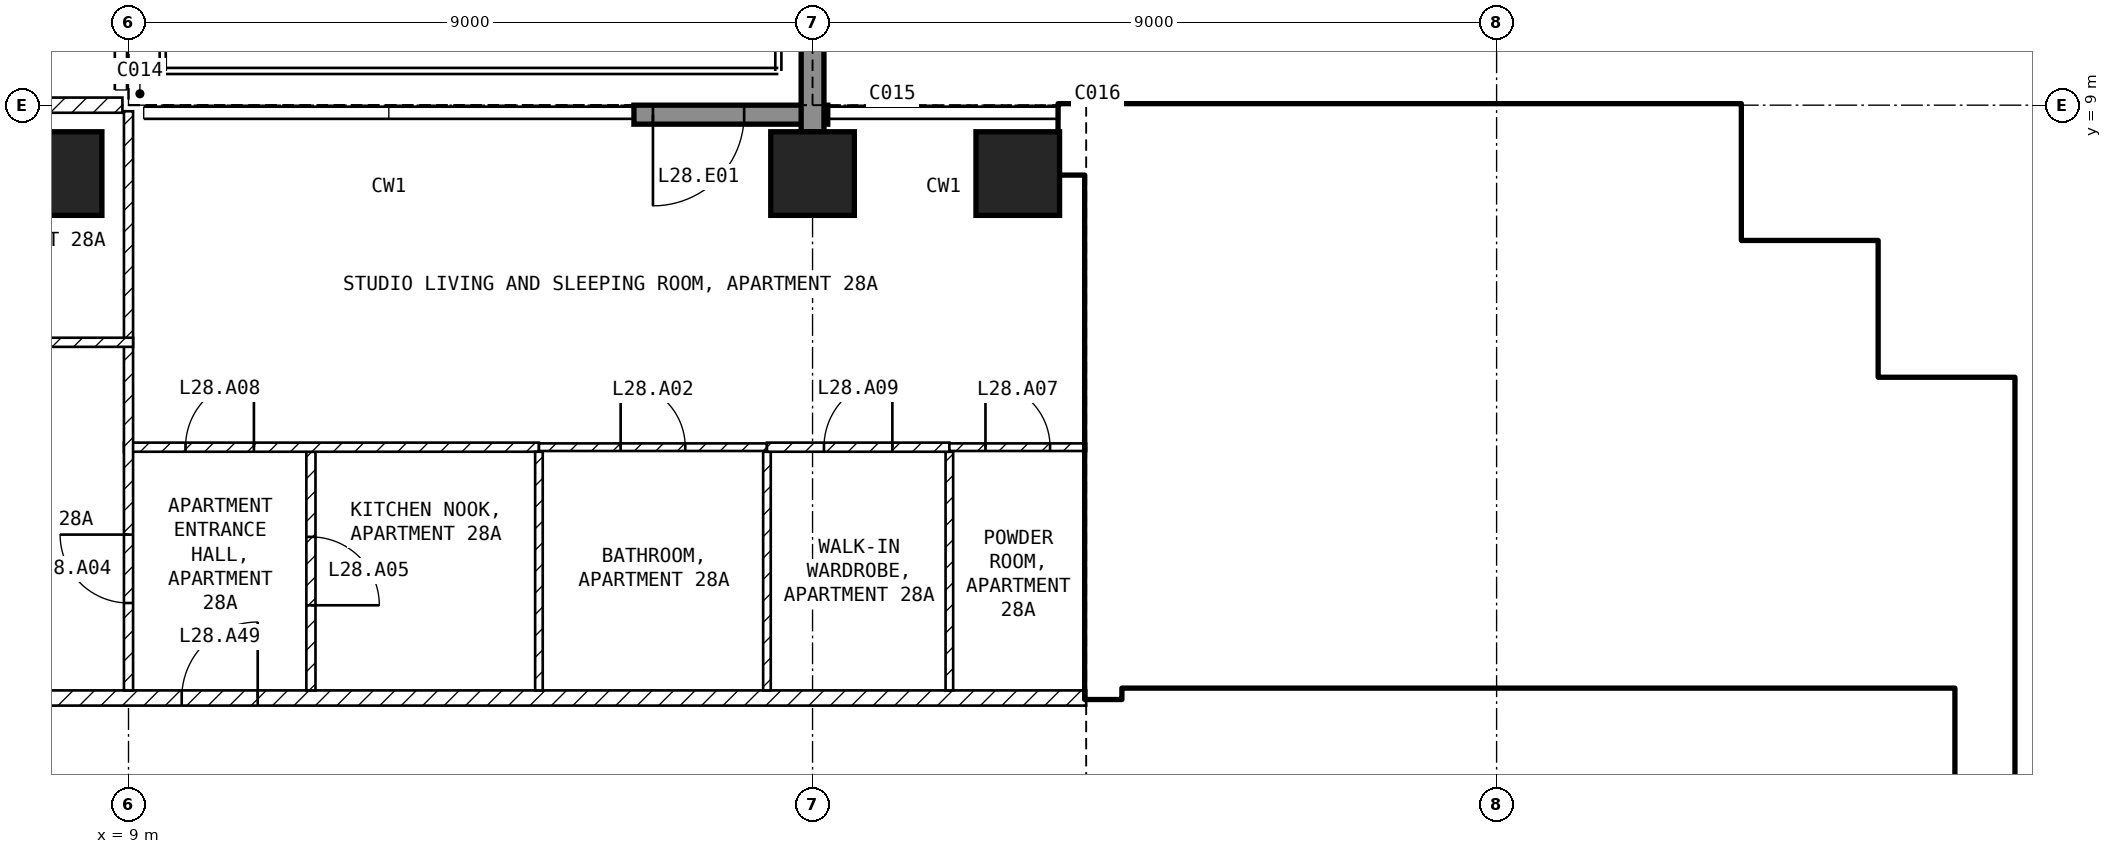
"""IFC4 building model, lengths in metres.
Left out: names, types, materials, properties, quantities, classifications, styles, units other than length and angle.
Written with IfcOpenShell. Run it as: python <this file> out.ifc"""

import sys

from ifc_helpers import new_model, si_unit, direction, frame, frame_2d, origin, origin_2d, place, context, subcontext, project, spatial, rectangle, extrude, element, fill, save


model = new_model("IFC4")
c1 = context("Model", 3, precision=1e-05, world=origin(), true_north=direction((0.0, 1.0)))
c2 = subcontext(c1, "Body", "Model", "MODEL_VIEW")
j1 = project(units=[si_unit("LENGTHUNIT", "METRE"), si_unit("PLANEANGLEUNIT", "RADIAN")], contexts=[c1])
p1 = place(None, origin())
s1 = spatial("IfcSite", under=j1, at=p1, CompositionType="ELEMENT")
p2 = place(p1, origin())
s2 = spatial("IfcBuilding", under=s1, at=p2, CompositionType="ELEMENT")
p3 = place(p2, frame((0.0, 0.0, 119.9)))
s3 = spatial("IfcBuildingStorey", under=s2, at=p3, CompositionType="ELEMENT", Elevation=119.9)
for number, where, z_axis, x_axis in (
    (1, (8.1, 8.1, -0.25), (0.0, 0.0, 1.0), (1.0, 0.0, 0.0)),
    (2, (18.0, 8.1, -0.25), (0.0, 0.0, 1.0), (1.0, 0.0, 0.0)),
    (3, (20.7, 8.1, -0.25), (0.0, 0.0, 1.0), (1.0, 0.0, 0.0)),
):
    element("IfcColumn", number, at=place(p3, frame(where, z_axis=z_axis, x_axis=x_axis)), inside=s3, PredefinedType="COLUMN", context=c2, shape_type="SweptSolid", body=[
        extrude(rectangle(XDim=1.1, YDim=1.1, at=origin_2d()), origin(), (0.0, 0.0, 1.0), 3.5),
    ])
p4 = place(p3, frame((18.2, 8.875, 0.0), z_axis=(0.0, 0.0, 1.0), x_axis=(-1.0, 0.0, 0.0)))
e4 = element("IfcWall", 4, at=p4, inside=s3, PredefinedType="SOLIDWALL", context=c2, shape_type="SweptSolid", body=[
    extrude(rectangle(XDim=2.55, YDim=0.25, at=frame_2d((1.275, 0.0))), origin(), (0.0, 0.0, 1.0), 3.25),
])
p5 = place(p4, frame((1.1, 0.0, 0.0)))
e5 = element("IfcOpeningElement", 5, at=p5, cuts=e4, PredefinedType="OPENING", context=c2, shape_type="SweptSolid", body=[
    extrude(rectangle(XDim=1.2, YDim=2.4, at=frame_2d((0.6, 1.2))), frame((0.0, 0.135, 0.0), z_axis=(0.0, -1.0, 0.0), x_axis=(1.0, 0.0, 0.0)), (0.0, 0.0, 1.0), 0.27),
])
p6 = place(p3, frame((18.0, 8.65, 0.0), z_axis=(0.0, 0.0, 1.0), x_axis=(0.0, 1.0, 0.0)))
e6 = element("IfcWall", 6, at=p6, inside=s3, PredefinedType="SOLIDWALL", context=c2, shape_type="SweptSolid", body=[
    extrude(rectangle(XDim=3.09, YDim=0.3, at=frame_2d((1.545, 0.0))), origin(), (0.0, 0.0, 1.0), 3.25),
])
p7 = place(p3, frame((33.425, -4.65, 0.0), z_axis=(0.0, 0.0, 1.0), x_axis=(0.0, 1.0, 0.0)))
e7 = element("IfcWall", 7, at=p7, inside=s3, PredefinedType="SHEAR", context=c2, shape_type="SweptSolid", body=[
    extrude(rectangle(XDim=10.05, YDim=0.75, at=frame_2d((5.025, 0.0))), origin(), (0.0, 0.0, 1.0), 3.25),
])
for number, where, z_axis, x_axis in (
    (8, (31.25, 5.025, 0.0), (0.0, 0.0, 1.0), (1.0, 0.0, 0.0)),
    (9, (31.625, 5.4, 0.0), (0.0, 0.0, 1.0), (0.0, 1.0, 0.0)),
    (10, (29.45, 6.825, 0.0), (0.0, 0.0, 1.0), (1.0, 0.0, 0.0)),
    (11, (29.825, 7.2, 0.0), (0.0, 0.0, 1.0), (0.0, 1.0, 0.0)),
):
    element("IfcWall", number, at=place(p3, frame(where, z_axis=z_axis, x_axis=x_axis)), inside=s3, PredefinedType="SHEAR", context=c2, shape_type="SweptSolid", body=[
        extrude(rectangle(XDim=1.8, YDim=0.75, at=frame_2d((0.9, 0.0))), origin(), (0.0, 0.0, 1.0), 3.25),
    ])
p8 = place(p3, frame((21.25, 8.55, 0.0), z_axis=(0.0, 0.0, 1.0), x_axis=(1.0, 0.0, 0.0)))
e12 = element("IfcWall", 12, at=p8, inside=s3, PredefinedType="SHEAR", context=c2, shape_type="SweptSolid", body=[
    extrude(rectangle(XDim=8.2, YDim=0.9, at=frame_2d((4.1, 0.0))), origin(), (0.0, 0.0, 1.0), 3.25),
])
p9 = place(p3, frame((21.825, 1.2, 0.0), z_axis=(0.0, 0.0, 1.0), x_axis=(0.0, 1.0, 0.0)))
e13 = element("IfcWall", 13, at=p9, inside=s3, PredefinedType="SHEAR", context=c2, shape_type="SweptSolid", body=[
    extrude(rectangle(XDim=6.9, YDim=0.45, at=frame_2d((3.45, 0.0))), origin(), (0.0, 0.0, 1.0), 3.25),
])
p10 = place(p3, frame((22.05, 1.45, 0.0), z_axis=(0.0, 0.0, 1.0), x_axis=(1.0, 0.0, 0.0)))
e14 = element("IfcWall", 14, at=p10, inside=s3, PredefinedType="SOLIDWALL", context=c2, shape_type="SweptSolid", body=[
    extrude(rectangle(XDim=11.0, YDim=0.2, at=frame_2d((5.5, 0.0))), origin(), (0.0, 0.0, 1.0), 3.25),
])
p11 = place(p10, frame((0.75, 0.0, 0.0)))
e15 = element("IfcOpeningElement", 15, at=p11, cuts=e14, PredefinedType="OPENING", context=c2, shape_type="SweptSolid", body=[
    extrude(rectangle(XDim=1.0, YDim=2.1, at=frame_2d((0.5, 1.05))), frame((0.0, 0.11, 0.0), z_axis=(0.0, -1.0, 0.0), x_axis=(1.0, 0.0, 0.0)), (0.0, 0.0, 1.0), 0.22),
])
p12 = place(p10, frame((3.25, 0.0, 0.0)))
e16 = element("IfcOpeningElement", 16, at=p12, cuts=e14, PredefinedType="OPENING", context=c2, shape_type="SweptSolid", body=[
    extrude(rectangle(XDim=1.0, YDim=2.1, at=frame_2d((0.5, 1.05))), frame((0.0, 0.11, 0.0), z_axis=(0.0, -1.0, 0.0), x_axis=(1.0, 0.0, 0.0)), (0.0, 0.0, 1.0), 0.22),
])
p13 = place(p10, frame((9.075, 0.0, 0.0)))
e17 = element("IfcOpeningElement", 17, at=p13, cuts=e14, PredefinedType="OPENING", context=c2, shape_type="SweptSolid", body=[
    extrude(rectangle(XDim=0.9, YDim=2.1, at=frame_2d((0.45, 1.05))), frame((0.0, 0.11, 0.0), z_axis=(0.0, -1.0, 0.0), x_axis=(1.0, 0.0, 0.0)), (0.0, 0.0, 1.0), 0.22),
])
p14 = place(p3, frame((22.05, 5.15, 0.0), z_axis=(0.0, 0.0, 1.0), x_axis=(1.0, 0.0, 0.0)))
e18 = element("IfcWall", 18, at=p14, inside=s3, PredefinedType="SOLIDWALL", context=c2, shape_type="SweptSolid", body=[
    extrude(rectangle(XDim=6.3, YDim=0.2, at=frame_2d((3.15, 0.0))), origin(), (0.0, 0.0, 1.0), 3.25),
])
p15 = place(p14, frame((0.2, 0.0, 0.0)))
e19 = element("IfcOpeningElement", 19, at=p15, cuts=e18, PredefinedType="OPENING", context=c2, shape_type="SweptSolid", body=[
    extrude(rectangle(XDim=1.0, YDim=2.1, at=frame_2d((0.5, 1.05))), frame((0.0, 0.11, 0.0), z_axis=(0.0, -1.0, 0.0), x_axis=(1.0, 0.0, 0.0)), (0.0, 0.0, 1.0), 0.22),
])
p16 = place(p3, frame((28.25, 5.25, 0.0), z_axis=(0.0, 0.0, 1.0), x_axis=(0.0, 1.0, 0.0)))
e20 = element("IfcWall", 20, at=p16, inside=s3, PredefinedType="SOLIDWALL", context=c2, shape_type="SweptSolid", body=[
    extrude(rectangle(XDim=2.85, YDim=0.2, at=frame_2d((1.425, 0.0))), origin(), (0.0, 0.0, 1.0), 3.25),
])
p17 = place(p3, frame((27.2, 3.95, 0.0), z_axis=(0.0, 0.0, 1.0), x_axis=(1.0, 0.0, 0.0)))
e21 = element("IfcWall", 21, at=p17, inside=s3, PredefinedType="SOLIDWALL", context=c2, shape_type="SweptSolid", body=[
    extrude(rectangle(XDim=5.85, YDim=0.2, at=frame_2d((2.925, 0.0))), origin(), (0.0, 0.0, 1.0), 3.25),
])
p18 = place(p3, frame((27.1, 1.55, 0.0), z_axis=(0.0, 0.0, 1.0), x_axis=(0.0, 1.0, 0.0)))
e22 = element("IfcWall", 22, at=p18, inside=s3, PredefinedType="SOLIDWALL", context=c2, shape_type="SweptSolid", body=[
    extrude(rectangle(XDim=3.5, YDim=0.2, at=frame_2d((1.75, 0.0))), origin(), (0.0, 0.0, 1.0), 3.25),
])
p19 = place(p18, frame((0.6, 0.0, 0.0)))
e23 = element("IfcOpeningElement", 23, at=p19, cuts=e22, PredefinedType="OPENING", context=c2, shape_type="SweptSolid", body=[
    extrude(rectangle(XDim=1.1, YDim=2.1, at=frame_2d((0.55, 1.05))), frame((0.0, 0.11, 0.0), z_axis=(0.0, -1.0, 0.0), x_axis=(1.0, 0.0, 0.0)), (0.0, 0.0, 1.0), 0.22),
])
p20 = place(p18, frame((2.6, 0.0, 0.0)))
e24 = element("IfcOpeningElement", 24, at=p20, cuts=e22, PredefinedType="OPENING", context=c2, shape_type="SweptSolid", body=[
    extrude(rectangle(XDim=0.8, YDim=2.1, at=frame_2d((0.4, 1.05))), frame((0.0, 0.11, 0.0), z_axis=(0.0, -1.0, 0.0), x_axis=(1.0, 0.0, 0.0)), (0.0, 0.0, 1.0), 0.22),
])
p21 = place(p3, frame((30.0, 1.55, 0.0), z_axis=(0.0, 0.0, 1.0), x_axis=(0.0, 1.0, 0.0)))
e25 = element("IfcWall", 25, at=p21, inside=s3, PredefinedType="SOLIDWALL", context=c2, shape_type="SweptSolid", body=[
    extrude(rectangle(XDim=2.3, YDim=0.2, at=frame_2d((1.15, 0.0))), origin(), (0.0, 0.0, 1.0), 3.25),
])
p22 = place(p3, frame((4.4, 1.2, 0.0), z_axis=(0.0, 0.0, 1.0), x_axis=(1.0, 0.0, 0.0)))
e26 = element("IfcWall", 26, at=p22, inside=s3, PredefinedType="PARTITIONING", context=c2, shape_type="SweptSolid", body=[
    extrude(rectangle(XDim=17.2, YDim=0.2, at=frame_2d((8.6, 0.0))), origin(), (0.0, 0.0, 1.0), 3.25),
])
p23 = place(p22, frame((5.3, 0.0, 0.0)))
e27 = element("IfcOpeningElement", 27, at=p23, cuts=e26, PredefinedType="OPENING", context=c2, shape_type="SweptSolid", body=[
    extrude(rectangle(XDim=1.0, YDim=2.1, at=frame_2d((0.5, 1.05))), frame((0.0, 0.11, 0.0), z_axis=(0.0, -1.0, 0.0), x_axis=(1.0, 0.0, 0.0)), (0.0, 0.0, 1.0), 0.22),
])
p24 = place(p3, frame((-8.92, 9.0, 0.0), z_axis=(0.0, 0.0, 1.0), x_axis=(1.0, 0.0, 0.0)))
e28 = element("IfcWall", 28, at=p24, inside=s3, PredefinedType="PARTITIONING", context=c2, shape_type="SweptSolid", body=[
    extrude(rectangle(XDim=17.84, YDim=0.2, at=frame_2d((8.92, 0.0))), origin(), (0.0, 0.0, 1.0), 3.25),
])
p25 = place(p24, frame((8.42, 0.0, 0.0)))
e29 = element("IfcOpeningElement", 29, at=p25, cuts=e28, PredefinedType="OPENING", context=c2, shape_type="SweptSolid", body=[
    extrude(rectangle(XDim=1.0, YDim=2.1, at=frame_2d((0.5, 1.05))), frame((0.0, 0.11, 0.0), z_axis=(0.0, -1.0, 0.0), x_axis=(1.0, 0.0, 0.0)), (0.0, 0.0, 1.0), 0.22),
])
p26 = place(p3, frame((11.4, 4.44, 0.0), z_axis=(0.0, 0.0, 1.0), x_axis=(0.0, -1.0, 0.0)))
e30 = element("IfcWall", 30, at=p26, inside=s3, PredefinedType="PARTITIONING", context=c2, shape_type="SweptSolid", body=[
    extrude(rectangle(XDim=3.14, YDim=0.12, at=frame_2d((1.57, 0.0))), origin(), (0.0, 0.0, 1.0), 3.25),
])
p27 = place(p26, frame((1.12, 0.0, 0.0)))
e31 = element("IfcOpeningElement", 31, at=p27, cuts=e30, PredefinedType="OPENING", context=c2, shape_type="SweptSolid", body=[
    extrude(rectangle(XDim=0.9, YDim=2.1, at=frame_2d((0.45, 1.05))), frame((0.0, 0.07, 0.0), z_axis=(0.0, -1.0, 0.0), x_axis=(1.0, 0.0, 0.0)), (0.0, 0.0, 1.0), 0.14),
])
p28 = place(p3, frame((8.94, 4.5, 0.0), z_axis=(0.0, 0.0, 1.0), x_axis=(1.0, 0.0, 0.0)))
e32 = element("IfcWall", 32, at=p28, inside=s3, PredefinedType="PARTITIONING", context=c2, shape_type="SweptSolid", body=[
    extrude(rectangle(XDim=5.46, YDim=0.12, at=frame_2d((2.73, 0.0))), origin(), (0.0, 0.0, 1.0), 3.25),
])
p29 = place(p28, frame((0.81, 0.0, 0.0)))
e33 = element("IfcOpeningElement", 33, at=p29, cuts=e32, PredefinedType="OPENING", context=c2, shape_type="SweptSolid", body=[
    extrude(rectangle(XDim=0.9, YDim=2.1, at=frame_2d((0.45, 1.05))), frame((0.0, 0.07, 0.0), z_axis=(0.0, -1.0, 0.0), x_axis=(1.0, 0.0, 0.0)), (0.0, 0.0, 1.0), 0.14),
])
p30 = place(p3, frame((9.0, 1.3, 0.0), z_axis=(0.0, 0.0, 1.0), x_axis=(0.0, 1.0, 0.0)))
e34 = element("IfcWall", 34, at=p30, inside=s3, PredefinedType="PARTITIONING", context=c2, shape_type="SweptSolid", body=[
    extrude(rectangle(XDim=7.62, YDim=0.12, at=frame_2d((3.81, 0.0))), origin(), (0.0, 0.0, 1.0), 3.25),
])
p31 = place(p30, frame((1.15, 0.0, 0.0)))
e35 = element("IfcOpeningElement", 35, at=p31, cuts=e34, PredefinedType="OPENING", context=c2, shape_type="SweptSolid", body=[
    extrude(rectangle(XDim=0.9, YDim=2.1, at=frame_2d((0.45, 1.05))), frame((0.0, 0.07, 0.0), z_axis=(0.0, -1.0, 0.0), x_axis=(1.0, 0.0, 0.0)), (0.0, 0.0, 1.0), 0.14),
])
for number, where, z_axis, x_axis in (
    (36, (14.4, 4.44, 0.0), (0.0, 0.0, 1.0), (0.0, -1.0, 0.0)),
    (37, (17.4, 4.44, 0.0), (0.0, 0.0, 1.0), (0.0, -1.0, 0.0)),
):
    element("IfcWall", number, at=place(p3, frame(where, z_axis=z_axis, x_axis=x_axis)), inside=s3, PredefinedType="PARTITIONING", context=c2, shape_type="SweptSolid", body=[
        extrude(rectangle(XDim=3.14, YDim=0.1, at=frame_2d((1.57, 0.0))), origin(), (0.0, 0.0, 1.0), 3.25),
    ])
p32 = place(p3, frame((14.4, 4.5, 0.0), z_axis=(0.0, 0.0, 1.0), x_axis=(1.0, 0.0, 0.0)))
e38 = element("IfcWall", 38, at=p32, inside=s3, PredefinedType="PARTITIONING", context=c2, shape_type="SweptSolid", body=[
    extrude(rectangle(XDim=3.0, YDim=0.1, at=frame_2d((1.5, 0.0))), origin(), (0.0, 0.0, 1.0), 3.25),
])
p33 = place(p32, frame((1.075, 0.0, 0.0)))
e39 = element("IfcOpeningElement", 39, at=p33, cuts=e38, PredefinedType="OPENING", context=c2, shape_type="SweptSolid", body=[
    extrude(rectangle(XDim=0.85, YDim=2.1, at=frame_2d((0.425, 1.05))), frame((0.0, 0.06, 0.0), z_axis=(0.0, -1.0, 0.0), x_axis=(1.0, 0.0, 0.0)), (0.0, 0.0, 1.0), 0.12),
])
p34 = place(p3, frame((19.8, 4.44, 0.0), z_axis=(0.0, 0.0, 1.0), x_axis=(0.0, -1.0, 0.0)))
e40 = element("IfcWall", 40, at=p34, inside=s3, PredefinedType="PARTITIONING", context=c2, shape_type="SweptSolid", body=[
    extrude(rectangle(XDim=3.14, YDim=0.1, at=frame_2d((1.57, 0.0))), origin(), (0.0, 0.0, 1.0), 3.25),
])
p35 = place(p3, frame((17.4, 4.5, 0.0), z_axis=(0.0, 0.0, 1.0), x_axis=(1.0, 0.0, 0.0)))
e41 = element("IfcWall", 41, at=p35, inside=s3, PredefinedType="PARTITIONING", context=c2, shape_type="SweptSolid", body=[
    extrude(rectangle(XDim=2.4, YDim=0.12, at=frame_2d((1.2, 0.0))), origin(), (0.0, 0.0, 1.0), 3.25),
])
p36 = place(p35, frame((0.75, 0.0, 0.0)))
e42 = element("IfcOpeningElement", 42, at=p36, cuts=e41, PredefinedType="OPENING", context=c2, shape_type="SweptSolid", body=[
    extrude(rectangle(XDim=0.9, YDim=2.1, at=frame_2d((0.45, 1.05))), frame((0.0, 0.07, 0.0), z_axis=(0.0, -1.0, 0.0), x_axis=(1.0, 0.0, 0.0)), (0.0, 0.0, 1.0), 0.14),
])
p37 = place(p3, frame((19.8, 4.5, 0.0), z_axis=(0.0, 0.0, 1.0), x_axis=(1.0, 0.0, 0.0)))
e43 = element("IfcWall", 43, at=p37, inside=s3, PredefinedType="PARTITIONING", context=c2, shape_type="SweptSolid", body=[
    extrude(rectangle(XDim=1.8, YDim=0.1, at=frame_2d((0.9, 0.0))), origin(), (0.0, 0.0, 1.0), 3.25),
])
p38 = place(p37, frame((0.475, 0.0, 0.0)))
e44 = element("IfcOpeningElement", 44, at=p38, cuts=e43, PredefinedType="OPENING", context=c2, shape_type="SweptSolid", body=[
    extrude(rectangle(XDim=0.85, YDim=2.1, at=frame_2d((0.425, 1.05))), frame((0.0, 0.06, 0.0), z_axis=(0.0, -1.0, 0.0), x_axis=(1.0, 0.0, 0.0)), (0.0, 0.0, 1.0), 0.12),
])
p39 = place(p3, frame((4.44, 5.88, 0.0), z_axis=(0.0, 0.0, 1.0), x_axis=(1.0, 0.0, 0.0)))
e45 = element("IfcWall", 45, at=p39, inside=s3, PredefinedType="PARTITIONING", context=c2, shape_type="SweptSolid", body=[
    extrude(rectangle(XDim=4.62, YDim=0.12, at=frame_2d((2.31, 0.0))), origin(), (0.0, 0.0, 1.0), 3.25),
])
p40 = place(p39, frame((1.86, 0.0, 0.0)))
e46 = element("IfcOpeningElement", 46, at=p40, cuts=e45, PredefinedType="OPENING", context=c2, shape_type="SweptSolid", body=[
    extrude(rectangle(XDim=0.9, YDim=2.1, at=frame_2d((0.45, 1.05))), frame((0.0, 0.07, 0.0), z_axis=(0.0, -1.0, 0.0), x_axis=(1.0, 0.0, 0.0)), (0.0, 0.0, 1.0), 0.14),
])
p41 = place(p5, origin())
e47 = element("IfcDoor", 47, at=p41, inside=s3, OperationType="SINGLE_SWING_RIGHT", PredefinedType="DOOR", context=c2, shape_type="SweptSolid", body=[
    extrude(rectangle(XDim=1.2, YDim=2.4, at=frame_2d((0.6, 1.2))), frame((0.0, 0.025, 0.0), z_axis=(0.0, -1.0, 0.0), x_axis=(1.0, 0.0, 0.0)), (0.0, 0.0, 1.0), 0.05),
])
fill(e5, e47)
p42 = place(p19, origin())
e48 = element("IfcDoor", 48, at=p42, inside=s3, OperationType="DOUBLE_DOOR_SLIDING", PredefinedType="DOOR", context=c2, shape_type="SweptSolid", body=[
    extrude(rectangle(XDim=1.1, YDim=2.1, at=frame_2d((0.55, 1.05))), frame((0.0, 0.025, 0.0), z_axis=(0.0, -1.0, 0.0), x_axis=(1.0, 0.0, 0.0)), (0.0, 0.0, 1.0), 0.05),
])
fill(e23, e48)
p43 = place(p15, origin())
e49 = element("IfcDoor", 49, at=p43, inside=s3, OperationType="SINGLE_SWING_LEFT", PredefinedType="DOOR", context=c2, shape_type="SweptSolid", body=[
    extrude(rectangle(XDim=1.0, YDim=2.1, at=frame_2d((0.5, 1.05))), frame((0.0, 0.025, 0.0), z_axis=(0.0, -1.0, 0.0), x_axis=(1.0, 0.0, 0.0)), (0.0, 0.0, 1.0), 0.05),
])
fill(e19, e49)
p44 = place(p11, origin())
e50 = element("IfcDoor", 50, at=p44, inside=s3, OperationType="SINGLE_SWING_LEFT", PredefinedType="DOOR", context=c2, shape_type="SweptSolid", body=[
    extrude(rectangle(XDim=1.0, YDim=2.1, at=frame_2d((0.5, 1.05))), frame((0.0, 0.025, 0.0), z_axis=(0.0, -1.0, 0.0), x_axis=(1.0, 0.0, 0.0)), (0.0, 0.0, 1.0), 0.05),
])
fill(e15, e50)
p45 = place(p12, origin())
e51 = element("IfcDoor", 51, at=p45, inside=s3, OperationType="SINGLE_SWING_LEFT", PredefinedType="DOOR", context=c2, shape_type="SweptSolid", body=[
    extrude(rectangle(XDim=1.0, YDim=2.1, at=frame_2d((0.5, 1.05))), frame((0.0, 0.025, 0.0), z_axis=(0.0, -1.0, 0.0), x_axis=(1.0, 0.0, 0.0)), (0.0, 0.0, 1.0), 0.05),
])
fill(e16, e51)
p46 = place(p20, origin())
e52 = element("IfcDoor", 52, at=p46, inside=s3, OperationType="SINGLE_SWING_LEFT", PredefinedType="DOOR", context=c2, shape_type="SweptSolid", body=[
    extrude(rectangle(XDim=0.8, YDim=2.1, at=frame_2d((0.4, 1.05))), frame((0.0, 0.025, 0.0), z_axis=(0.0, -1.0, 0.0), x_axis=(1.0, 0.0, 0.0)), (0.0, 0.0, 1.0), 0.05),
])
fill(e24, e52)
p47 = place(p13, origin())
e53 = element("IfcDoor", 53, at=p47, inside=s3, OperationType="SINGLE_SWING_LEFT", PredefinedType="DOOR", context=c2, shape_type="SweptSolid", body=[
    extrude(rectangle(XDim=0.9, YDim=2.1, at=frame_2d((0.45, 1.05))), frame((0.0, 0.025, 0.0), z_axis=(0.0, -1.0, 0.0), x_axis=(1.0, 0.0, 0.0)), (0.0, 0.0, 1.0), 0.05),
])
fill(e17, e53)
p48 = place(p33, origin())
e54 = element("IfcDoor", 54, at=p48, inside=s3, OperationType="SINGLE_SWING_LEFT", PredefinedType="DOOR", context=c2, shape_type="SweptSolid", body=[
    extrude(rectangle(XDim=0.85, YDim=2.1, at=frame_2d((0.425, 1.05))), frame((0.0, 0.025, 0.0), z_axis=(0.0, -1.0, 0.0), x_axis=(1.0, 0.0, 0.0)), (0.0, 0.0, 1.0), 0.05),
])
fill(e39, e54)
p49 = place(p31, origin())
e55 = element("IfcDoor", 55, at=p49, inside=s3, OperationType="SINGLE_SWING_RIGHT", PredefinedType="DOOR", context=c2, shape_type="SweptSolid", body=[
    extrude(rectangle(XDim=0.9, YDim=2.1, at=frame_2d((0.45, 1.05))), frame((0.0, 0.025, 0.0), z_axis=(0.0, -1.0, 0.0), x_axis=(1.0, 0.0, 0.0)), (0.0, 0.0, 1.0), 0.05),
])
fill(e35, e55)
p50 = place(p27, origin())
e56 = element("IfcDoor", 56, at=p50, inside=s3, OperationType="SINGLE_SWING_RIGHT", PredefinedType="DOOR", context=c2, shape_type="SweptSolid", body=[
    extrude(rectangle(XDim=0.9, YDim=2.1, at=frame_2d((0.45, 1.05))), frame((0.0, 0.025, 0.0), z_axis=(0.0, -1.0, 0.0), x_axis=(1.0, 0.0, 0.0)), (0.0, 0.0, 1.0), 0.05),
])
fill(e31, e56)
p51 = place(p38, origin())
e57 = element("IfcDoor", 57, at=p51, inside=s3, OperationType="SINGLE_SWING_LEFT", PredefinedType="DOOR", context=c2, shape_type="SweptSolid", body=[
    extrude(rectangle(XDim=0.85, YDim=2.1, at=frame_2d((0.425, 1.05))), frame((0.0, 0.025, 0.0), z_axis=(0.0, -1.0, 0.0), x_axis=(1.0, 0.0, 0.0)), (0.0, 0.0, 1.0), 0.05),
])
fill(e44, e57)
p52 = place(p29, origin())
e58 = element("IfcDoor", 58, at=p52, inside=s3, OperationType="SINGLE_SWING_RIGHT", PredefinedType="DOOR", context=c2, shape_type="SweptSolid", body=[
    extrude(rectangle(XDim=0.9, YDim=2.1, at=frame_2d((0.45, 1.05))), frame((0.0, 0.025, 0.0), z_axis=(0.0, -1.0, 0.0), x_axis=(1.0, 0.0, 0.0)), (0.0, 0.0, 1.0), 0.05),
])
fill(e33, e58)
p53 = place(p36, origin())
e59 = element("IfcDoor", 59, at=p53, inside=s3, OperationType="SINGLE_SWING_RIGHT", PredefinedType="DOOR", context=c2, shape_type="SweptSolid", body=[
    extrude(rectangle(XDim=0.9, YDim=2.1, at=frame_2d((0.45, 1.05))), frame((0.0, 0.025, 0.0), z_axis=(0.0, -1.0, 0.0), x_axis=(1.0, 0.0, 0.0)), (0.0, 0.0, 1.0), 0.05),
])
fill(e42, e59)
p54 = place(p23, origin())
e60 = element("IfcDoor", 60, at=p54, inside=s3, OperationType="SINGLE_SWING_RIGHT", PredefinedType="DOOR", context=c2, shape_type="SweptSolid", body=[
    extrude(rectangle(XDim=1.0, YDim=2.1, at=frame_2d((0.5, 1.05))), frame((0.0, 0.025, 0.0), z_axis=(0.0, -1.0, 0.0), x_axis=(1.0, 0.0, 0.0)), (0.0, 0.0, 1.0), 0.05),
])
fill(e27, e60)
save(model, sys.argv[1])
